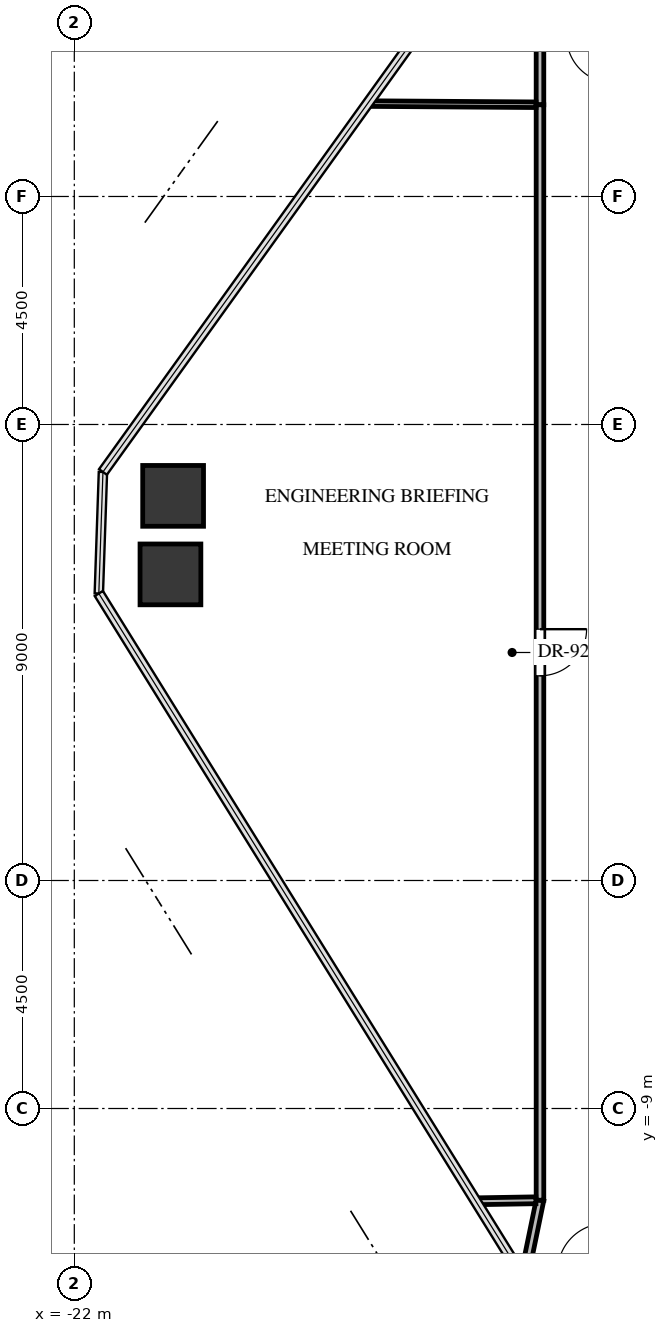
"""IFC4 building model, lengths in metres.
Left out: names, types, materials, properties, quantities, classifications, styles, units other than length and angle.
Written with IfcOpenShell. Run it as: python <this file> out.ifc"""

import sys

from ifc_helpers import new_model, si_unit, direction, frame, frame_2d, origin, origin_2d, place, context, subcontext, project, spatial, rectangle, extrude, source, transform, mapped, element, fill, save


model = new_model("IFC4")
c1 = context("Model", 3, precision=1e-05, world=origin(), true_north=direction((0.0, 1.0)))
c2 = subcontext(c1, "Body", "Model", "MODEL_VIEW")
j1 = project(units=[si_unit("LENGTHUNIT", "METRE"), si_unit("PLANEANGLEUNIT", "RADIAN")], contexts=[c1])
p1 = place(None, origin())
s1 = spatial("IfcSite", under=j1, at=p1, CompositionType="ELEMENT")
p2 = place(p1, origin())
s2 = spatial("IfcBuilding", under=s1, at=p2, CompositionType="ELEMENT")
p3 = place(p2, frame((0.0, 0.0, 97.5)))
s3 = spatial("IfcBuildingStorey", under=s2, at=p3, CompositionType="ELEMENT", Elevation=97.5)
m1 = source(origin(), c2, "Body", "SweptSolid", [
    extrude(rectangle(XDim=1.2, YDim=1.2, at=origin_2d()), origin(), (0.0, 0.0, 1.0), 3.3),
])
for number, where, z_axis, x_axis in (
    (1, (-20.103, 1.542, -0.24), (0.0, 0.0, 1.0), (1.0, 0.0, 0.0)),
    (2, (-20.05, 3.091, -0.24), (0.0, 0.0, 1.0), (1.0, 0.0, 0.0)),
):
    element("IfcColumn", number, at=place(p3, frame(where, z_axis=z_axis, x_axis=x_axis)), inside=s3, PredefinedType="COLUMN", context=c2, shape_type="MappedRepresentation", body=[
        mapped(m1, transform((0.0, 0.0, 0.0), x_axis=(1.0, 0.0, 0.0), y_axis=(0.0, 1.0, 0.0), z_axis=(0.0, 0.0, 1.0), scale=1.0)),
    ])
p4 = place(p3, frame((-12.81, 12.081, 0.0), z_axis=(0.0, 0.0, 1.0), x_axis=(0.0, -1.0, 0.0)))
e3 = element("IfcWall", 3, at=p4, inside=s3, PredefinedType="PARTITIONING", context=c2, shape_type="SweptSolid", body=[
    extrude(rectangle(XDim=1.271, YDim=0.15, at=frame_2d((0.635, 0.0))), origin(), (0.0, 0.0, 1.0), 3.045),
])
p5 = place(p3, frame((-12.81, -10.81, 0.0), z_axis=(0.0, 0.0, 1.0), x_axis=(-0.201786289638, -0.979429575474, 0.0)))
e4 = element("IfcWall", 4, at=p5, inside=s3, PredefinedType="PARTITIONING", context=c2, shape_type="SweptSolid", body=[
    extrude(rectangle(XDim=1.498, YDim=0.15, at=frame_2d((0.749, 0.0))), origin(), (0.0, 0.0, 1.0), 3.045),
])
p6 = place(p3, frame((-12.81, 10.81, 0.0), z_axis=(0.0, 0.0, 1.0), x_axis=(0.0, -1.0, 0.0)))
e5 = element("IfcWall", 5, at=p6, inside=s3, PredefinedType="PARTITIONING", context=c2, shape_type="SweptSolid", body=[
    extrude(rectangle(XDim=21.62, YDim=0.15, at=frame_2d((10.81, 0.0))), origin(), (0.0, 0.0, 1.0), 2.212),
])
p7 = place(p6, frame((10.35, 0.0, 0.0)))
e6 = element("IfcOpeningElement", 6, at=p7, cuts=e5, PredefinedType="OPENING", context=c2, shape_type="SweptSolid", body=[
    extrude(rectangle(XDim=0.92, YDim=2.1, at=frame_2d((0.46, 1.05))), frame((0.0, 0.085, 0.0), z_axis=(0.0, -1.0, 0.0), x_axis=(1.0, 0.0, 0.0)), (0.0, 0.0, 1.0), 0.17),
])
p8 = place(p3, frame((-12.889, 10.811, 0.0), z_axis=(0.0, 0.0, 1.0), x_axis=(-0.999976657862, 0.006832549348, 0.0)))
e7 = element("IfcWall", 7, at=p8, inside=s3, PredefinedType="MOVABLE", context=c2, shape_type="SweptSolid", body=[
    extrude(rectangle(XDim=3.323, YDim=0.11, at=frame_2d((1.662, 0.0))), origin(), (0.0, 0.0, 1.0), 2.38),
])
p9 = place(p3, frame((-14.076, -10.831, 0.0), z_axis=(0.0, 0.0, 1.0), x_axis=(0.999860796611, 0.016684945308, 0.0)))
e8 = element("IfcWall", 8, at=p9, inside=s3, PredefinedType="PARTITIONING", context=c2, shape_type="SweptSolid", body=[
    extrude(rectangle(XDim=1.185, YDim=0.135, at=frame_2d((0.593, 0.0))), origin(), (0.0, 0.0, 1.0), 3.045),
])
m2 = source(origin(), c2, "Body", "SweptSolid", [
    extrude(rectangle(XDim=0.92, YDim=2.1, at=frame_2d((0.46, 1.05))), frame((0.0, 0.025, 0.0), z_axis=(0.0, -1.0, 0.0), x_axis=(1.0, 0.0, 0.0)), (0.0, 0.0, 1.0), 0.05),
])
p10 = place(p7, origin())
e9 = element("IfcDoor", 9, at=p10, inside=s3, OperationType="SINGLE_SWING_LEFT", PredefinedType="DOOR", context=c2, shape_type="MappedRepresentation", body=[
    mapped(m2, transform((0.0, 0.0, 0.0), x_axis=(1.0, 0.0, 0.0), y_axis=(0.0, 1.0, 0.0), z_axis=(0.0, 0.0, 1.0), scale=1.0)),
])
fill(e6, e9)
save(model, sys.argv[1])
